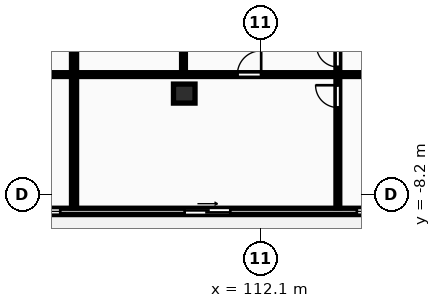
"""IFC4 building model, lengths in metres.
Left out: names, types, materials, properties, quantities, classifications, styles, units other than length and angle.
Written with IfcOpenShell. Run it as: python <this file> out.ifc"""

import sys

from ifc_helpers import new_model, si_unit, direction, frame, frame_2d, origin, origin_2d, place, context, subcontext, project, spatial, rectangle, extrude, element, fill, save


model = new_model("IFC4")
c1 = context("Model", 3, precision=1e-05, world=origin(), true_north=direction((0.0, 1.0)))
c2 = subcontext(c1, "Body", "Model", "MODEL_VIEW")
j1 = project(units=[si_unit("LENGTHUNIT", "METRE"), si_unit("PLANEANGLEUNIT", "RADIAN")], contexts=[c1])
p1 = place(None, origin())
s1 = spatial("IfcSite", under=j1, at=p1, CompositionType="ELEMENT")
p2 = place(p1, origin())
s2 = spatial("IfcBuilding", under=s1, at=p2, CompositionType="ELEMENT")
p3 = place(p2, frame((0.0, 0.0, 106.8)))
s3 = spatial("IfcBuildingStorey", under=s2, at=p3, CompositionType="ELEMENT", Elevation=106.8)
p4 = place(p3, frame((109.1, -4.2, 0.0), z_axis=(0.0, 0.0, 1.0), x_axis=(1.0, 0.0, 0.0)))
e1 = element("IfcColumn", 1, at=p4, inside=s3, PredefinedType="COLUMN", context=c2, shape_type="SweptSolid", body=[
    extrude(rectangle(XDim=0.85, YDim=0.75, at=origin_2d()), origin(), (0.0, 0.0, 1.0), 3.25),
])
p5 = place(p3, frame((72.7, -8.85, 0.0), z_axis=(0.0, 0.0, 1.0), x_axis=(1.0, 0.0, 0.0)))
e2 = element("IfcWall", 2, at=p5, inside=s3, PredefinedType="STANDARD", context=c2, shape_type="SweptSolid", body=[
    extrude(rectangle(XDim=58.0, YDim=0.25, at=frame_2d((29.0, 0.0))), origin(), (0.0, 0.0, 1.0), 2.97),
])
p6 = place(p5, frame((3.358, 0.0, 0.0)))
e3 = element("IfcOpeningElement", 3, at=p6, cuts=e2, PredefinedType="OPENING", context=c2, shape_type="SweptSolid", body=[
    extrude(rectangle(XDim=1.8, YDim=2.2, at=frame_2d((0.9, 1.1))), frame((0.0, 0.135, 0.0), z_axis=(0.0, -1.0, 0.0), x_axis=(1.0, 0.0, 0.0)), (0.0, 0.0, 1.0), 0.27),
])
p7 = place(p5, frame((12.755, 0.0, 0.85)))
e4 = element("IfcOpeningElement", 4, at=p7, cuts=e2, PredefinedType="OPENING", context=c2, shape_type="SweptSolid", body=[
    extrude(rectangle(XDim=2.4, YDim=1.9, at=frame_2d((1.2, 0.95))), frame((0.0, 0.135, 0.0), z_axis=(0.0, -1.0, 0.0), x_axis=(1.0, 0.0, 0.0)), (0.0, 0.0, 1.0), 0.27),
])
p8 = place(p5, frame((23.617, 0.0, 0.0)))
e5 = element("IfcOpeningElement", 5, at=p8, cuts=e2, PredefinedType="OPENING", context=c2, shape_type="SweptSolid", body=[
    extrude(rectangle(XDim=1.8, YDim=2.2, at=frame_2d((0.9, 1.1))), frame((0.0, 0.135, 0.0), z_axis=(0.0, -1.0, 0.0), x_axis=(1.0, 0.0, 0.0)), (0.0, 0.0, 1.0), 0.27),
])
p9 = place(p5, frame((29.705, 0.0, 0.85)))
e6 = element("IfcOpeningElement", 6, at=p9, cuts=e2, PredefinedType="OPENING", context=c2, shape_type="SweptSolid", body=[
    extrude(rectangle(XDim=1.8, YDim=1.8, at=frame_2d((0.9, 0.9))), frame((0.0, 0.135, 0.0), z_axis=(0.0, -1.0, 0.0), x_axis=(1.0, 0.0, 0.0)), (0.0, 0.0, 1.0), 0.27),
])
p10 = place(p5, frame((36.417, 0.0, 0.0)))
e7 = element("IfcOpeningElement", 7, at=p10, cuts=e2, PredefinedType="OPENING", context=c2, shape_type="SweptSolid", body=[
    extrude(rectangle(XDim=1.8, YDim=2.2, at=frame_2d((0.9, 1.1))), frame((0.0, 0.135, 0.0), z_axis=(0.0, -1.0, 0.0), x_axis=(1.0, 0.0, 0.0)), (0.0, 0.0, 1.0), 0.27),
])
p11 = place(p5, frame((43.213, 0.0, 0.85)))
e8 = element("IfcOpeningElement", 8, at=p11, cuts=e2, PredefinedType="OPENING", context=c2, shape_type="SweptSolid", body=[
    extrude(rectangle(XDim=1.8, YDim=1.8, at=frame_2d((0.9, 0.9))), frame((0.0, 0.135, 0.0), z_axis=(0.0, -1.0, 0.0), x_axis=(1.0, 0.0, 0.0)), (0.0, 0.0, 1.0), 0.27),
])
p12 = place(p5, frame((49.262, 0.0, 0.0)))
e9 = element("IfcOpeningElement", 9, at=p12, cuts=e2, PredefinedType="OPENING", context=c2, shape_type="SweptSolid", body=[
    extrude(rectangle(XDim=1.8, YDim=2.2, at=frame_2d((0.9, 1.1))), frame((0.0, 0.135, 0.0), z_axis=(0.0, -1.0, 0.0), x_axis=(1.0, 0.0, 0.0)), (0.0, 0.0, 1.0), 0.27),
])
p13 = place(p5, frame((54.9, 0.0, 0.85)))
e10 = element("IfcOpeningElement", 10, at=p13, cuts=e2, PredefinedType="OPENING", context=c2, shape_type="SweptSolid", body=[
    extrude(rectangle(XDim=2.4, YDim=1.9, at=frame_2d((1.2, 0.95))), frame((0.0, 0.135, 0.0), z_axis=(0.0, -1.0, 0.0), x_axis=(1.0, 0.0, 0.0)), (0.0, 0.0, 1.0), 0.27),
])
p14 = place(p3, frame((104.75, -8.7, 0.0), z_axis=(0.0, 0.0, 1.0), x_axis=(0.0, 1.0, 0.0)))
e11 = element("IfcWall", 11, at=p14, inside=s3, PredefinedType="PARTITIONING", context=c2, shape_type="SweptSolid", body=[
    extrude(rectangle(XDim=24.57, YDim=0.2, at=frame_2d((12.285, 0.0))), origin(), (0.0, 0.0, 1.0), 2.97),
])
p15 = place(p3, frame((92.413, -3.45, 0.0), z_axis=(0.0, 0.0, 1.0), x_axis=(1.0, 0.0, 0.0)))
e12 = element("IfcWall", 12, at=p15, inside=s3, PredefinedType="PARTITIONING", context=c2, shape_type="SweptSolid", body=[
    extrude(rectangle(XDim=12.257, YDim=0.15, at=frame_2d((6.128, 0.0))), origin(), (0.0, 0.0, 1.0), 2.97),
])
p16 = place(p15, frame((5.126, 0.0, 0.0)))
e13 = element("IfcOpeningElement", 13, at=p16, cuts=e12, PredefinedType="OPENING", context=c2, shape_type="SweptSolid", body=[
    extrude(rectangle(XDim=0.94, YDim=2.1, at=frame_2d((0.47, 1.05))), frame((0.0, 0.085, 0.0), z_axis=(0.0, -1.0, 0.0), x_axis=(1.0, 0.0, 0.0)), (0.0, 0.0, 1.0), 0.17),
])
p17 = place(p3, frame((109.07, -3.39, 0.0), z_axis=(0.0, 0.0, 1.0), x_axis=(0.0, 1.0, 0.0)))
e14 = element("IfcWall", 14, at=p17, inside=s3, PredefinedType="PARTITIONING", context=c2, shape_type="SweptSolid", body=[
    extrude(rectangle(XDim=5.0, YDim=0.15, at=frame_2d((2.5, 0.0))), origin(), (0.0, 0.0, 1.0), 2.2),
])
p18 = place(p17, frame((2.06, 0.0, 0.0)))
e15 = element("IfcOpeningElement", 15, at=p18, cuts=e14, PredefinedType="OPENING", context=c2, shape_type="SweptSolid", body=[
    extrude(rectangle(XDim=0.88, YDim=2.06, at=frame_2d((0.44, 1.03))), frame((0.0, 0.085, 0.0), z_axis=(0.0, -1.0, 0.0), x_axis=(1.0, 0.0, 0.0)), (0.0, 0.0, 1.0), 0.17),
])
p19 = place(p3, frame((115.163, -8.7, 0.0), z_axis=(0.0, 0.0, 1.0), x_axis=(0.0, 1.0, 0.0)))
e16 = element("IfcWall", 16, at=p19, inside=s3, PredefinedType="PARTITIONING", context=c2, shape_type="SweptSolid", body=[
    extrude(rectangle(XDim=10.31, YDim=0.15, at=frame_2d((5.155, 0.0))), origin(), (0.0, 0.0, 1.0), 2.97),
])
p20 = place(p19, frame((5.55, 0.0, 0.0)))
e17 = element("IfcOpeningElement", 17, at=p20, cuts=e16, PredefinedType="OPENING", context=c2, shape_type="SweptSolid", body=[
    extrude(rectangle(XDim=0.84, YDim=2.04, at=frame_2d((0.42, 1.02))), frame((0.0, 0.085, 0.0), z_axis=(0.0, -1.0, 0.0), x_axis=(1.0, 0.0, 0.0)), (0.0, 0.0, 1.0), 0.17),
])
p21 = place(p19, frame((8.04, 0.0, 0.0)))
e18 = element("IfcOpeningElement", 18, at=p21, cuts=e16, PredefinedType="OPENING", context=c2, shape_type="SweptSolid", body=[
    extrude(rectangle(XDim=0.84, YDim=2.04, at=frame_2d((0.42, 1.02))), frame((0.0, 0.085, 0.0), z_axis=(0.0, -1.0, 0.0), x_axis=(1.0, 0.0, 0.0)), (0.0, 0.0, 1.0), 0.17),
])
p22 = place(p19, frame((3.95, 0.0, 0.0)))
e19 = element("IfcOpeningElement", 19, at=p22, cuts=e16, PredefinedType="OPENING", context=c2, shape_type="SweptSolid", body=[
    extrude(rectangle(XDim=0.88, YDim=2.06, at=frame_2d((0.44, 1.03))), frame((0.0, 0.085, 0.0), z_axis=(0.0, -1.0, 0.0), x_axis=(1.0, 0.0, 0.0)), (0.0, 0.0, 1.0), 0.17),
])
p23 = place(p3, frame((104.83, -3.45, 0.0), z_axis=(0.0, 0.0, 1.0), x_axis=(1.0, 0.0, 0.0)))
e20 = element("IfcWall", 20, at=p23, inside=s3, PredefinedType="PARTITIONING", context=c2, shape_type="SweptSolid", body=[
    extrude(rectangle(XDim=13.673, YDim=0.15, at=frame_2d((6.837, 0.0))), origin(), (0.0, 0.0, 1.0), 2.97),
])
p24 = place(p23, frame((6.367, 0.0, 0.0)))
e21 = element("IfcOpeningElement", 21, at=p24, cuts=e20, PredefinedType="OPENING", context=c2, shape_type="SweptSolid", body=[
    extrude(rectangle(XDim=0.94, YDim=2.1, at=frame_2d((0.47, 1.05))), frame((0.0, 0.085, 0.0), z_axis=(0.0, -1.0, 0.0), x_axis=(1.0, 0.0, 0.0)), (0.0, 0.0, 1.0), 0.17),
])
p25 = place(p9, origin())
e22 = element("IfcWindow", 22, at=p25, inside=s3, PartitioningType="SINGLE_PANEL", PredefinedType="WINDOW", context=c2, shape_type="SweptSolid", body=[
    extrude(rectangle(XDim=1.8, YDim=1.8, at=frame_2d((0.9, 0.9))), frame((0.0, 0.03, 0.0), z_axis=(0.0, -1.0, 0.0), x_axis=(1.0, 0.0, 0.0)), (0.0, 0.0, 1.0), 0.06),
])
fill(e6, e22)
p26 = place(p10, origin())
e23 = element("IfcDoor", 23, at=p26, inside=s3, OperationType="SLIDING_TO_RIGHT", PredefinedType="DOOR", context=c2, shape_type="SweptSolid", body=[
    extrude(rectangle(XDim=1.8, YDim=2.2, at=frame_2d((0.9, 1.1))), frame((0.0, 0.025, 0.0), z_axis=(0.0, -1.0, 0.0), x_axis=(1.0, 0.0, 0.0)), (0.0, 0.0, 1.0), 0.05),
])
fill(e7, e23)
p27 = place(p11, origin())
e24 = element("IfcWindow", 24, at=p27, inside=s3, PartitioningType="SINGLE_PANEL", PredefinedType="WINDOW", context=c2, shape_type="SweptSolid", body=[
    extrude(rectangle(XDim=1.8, YDim=1.8, at=frame_2d((0.9, 0.9))), frame((0.0, 0.03, 0.0), z_axis=(0.0, -1.0, 0.0), x_axis=(1.0, 0.0, 0.0)), (0.0, 0.0, 1.0), 0.06),
])
fill(e8, e24)
p28 = place(p20, origin())
e25 = element("IfcDoor", 25, at=p28, inside=s3, OperationType="SINGLE_SWING_RIGHT", PredefinedType="DOOR", context=c2, shape_type="SweptSolid", body=[
    extrude(rectangle(XDim=0.84, YDim=2.04, at=frame_2d((0.42, 1.02))), frame((0.0, 0.025, 0.0), z_axis=(0.0, -1.0, 0.0), x_axis=(1.0, 0.0, 0.0)), (0.0, 0.0, 1.0), 0.05),
])
fill(e17, e25)
p29 = place(p22, origin())
e26 = element("IfcDoor", 26, at=p29, inside=s3, OperationType="SINGLE_SWING_RIGHT", PredefinedType="DOOR", context=c2, shape_type="SweptSolid", body=[
    extrude(rectangle(XDim=0.88, YDim=2.06, at=frame_2d((0.44, 1.03))), frame((0.0, 0.025, 0.0), z_axis=(0.0, -1.0, 0.0), x_axis=(1.0, 0.0, 0.0)), (0.0, 0.0, 1.0), 0.05),
])
fill(e19, e26)
p30 = place(p24, origin())
e27 = element("IfcDoor", 27, at=p30, inside=s3, OperationType="SINGLE_SWING_RIGHT", PredefinedType="DOOR", context=c2, shape_type="SweptSolid", body=[
    extrude(rectangle(XDim=0.94, YDim=2.1, at=frame_2d((0.47, 1.05))), frame((0.0, 0.025, 0.0), z_axis=(0.0, -1.0, 0.0), x_axis=(1.0, 0.0, 0.0)), (0.0, 0.0, 1.0), 0.05),
])
fill(e21, e27)
save(model, sys.argv[1])
